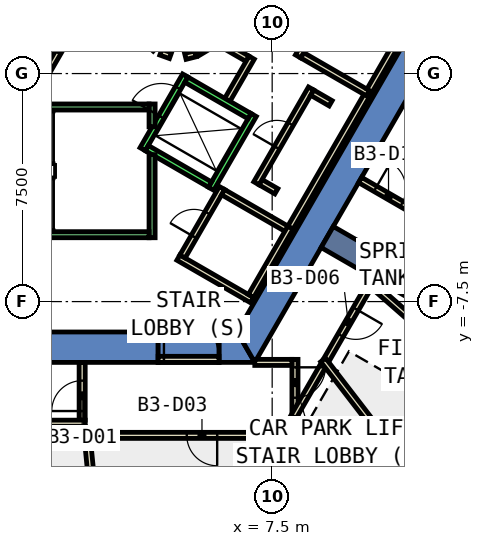
"""IFC4 building model, lengths in metres.
Left out: names, types, materials, properties, quantities, classifications, styles, units other than length and angle.
Written with IfcOpenShell. Run it as: python <this file> out.ifc"""

import sys

from ifc_helpers import new_model, si_unit, direction, frame, frame_2d, origin, place, context, subcontext, project, spatial, polyline, rectangle, outline, extrude, element, fill, save


model = new_model("IFC4")
c1 = context("Model", 3, precision=1e-05, world=origin(), true_north=direction((0.0, 1.0)))
c2 = subcontext(c1, "Body", "Model", "MODEL_VIEW")
j1 = project(units=[si_unit("LENGTHUNIT", "METRE"), si_unit("PLANEANGLEUNIT", "RADIAN")], contexts=[c1])
p1 = place(None, origin())
s1 = spatial("IfcSite", under=j1, at=p1, CompositionType="ELEMENT")
p2 = place(p1, origin())
s2 = spatial("IfcBuilding", under=s1, at=p2, CompositionType="ELEMENT")
p3 = place(p2, frame((0.0, 0.0, -16.5)))
s3 = spatial("IfcBuildingStorey", under=s2, at=p3, CompositionType="ELEMENT", Elevation=-16.5)
p4 = place(p3, origin())
e1 = element("IfcWall", 1, at=p4, inside=s3, PredefinedType="SHEAR", context=c2, shape_type="SweptSolid", body=[
    extrude(outline(polyline([(3.75, -9.5), (3.75, -8.5), (-6.351, -8.5), (-6.928, -9.5), (3.75, -9.5)])), origin(), (0.0, 0.0, 1.0), 5.08),
])
p5 = place(p3, origin())
e2 = element("IfcWall", 2, at=p5, inside=s3, PredefinedType="SHEAR", context=c2, shape_type="SweptSolid", body=[
    extrude(outline(polyline([(5.75, -8.5), (5.75, -9.5), (6.928, -9.5), (6.351, -8.5), (5.75, -8.5)])), origin(), (0.0, 0.0, 1.0), 5.08),
])
p6 = place(p3, frame((0.0, 0.0, 3.6)))
e3 = element("IfcWall", 3, at=p6, inside=s3, PredefinedType="SHEAR", context=c2, shape_type="SweptSolid", body=[
    extrude(outline(polyline([(5.75, -9.5), (5.75, -8.5), (3.75, -8.5), (3.75, -9.5), (5.75, -9.5)])), origin(), (0.0, 0.0, 1.0), 1.48),
])
p7 = place(p3, origin())
e4 = element("IfcWall", 4, at=p7, inside=s3, PredefinedType="SHEAR", context=c2, shape_type="SweptSolid", body=[
    extrude(outline(polyline([(6.928, -9.5), (13.856, 2.5), (12.702, 2.5), (6.351, -8.5), (6.928, -9.5)])), origin(), (0.0, 0.0, 1.0), 5.08),
])
p8 = place(p3, frame((9.31, -5.375, 0.0), z_axis=(0.0, 0.0, 1.0), x_axis=(0.866017533419, -0.500013631625, 0.0)))
e5 = element("IfcWall", 5, at=p8, inside=s3, PredefinedType="SHEAR", context=c2, shape_type="SweptSolid", body=[
    extrude(rectangle(XDim=9.0, YDim=0.8, at=frame_2d((4.5, 0.0))), origin(), (0.0, 0.0, 1.0), 5.08),
])
p9 = place(p3, frame((1.25, -11.4, 0.0), z_axis=(0.0, 0.0, 1.0), x_axis=(0.0, 1.0, 0.0)))
e6 = element("IfcWall", 6, at=p9, inside=s3, PredefinedType="PARTITIONING", context=c2, shape_type="SweptSolid", body=[
    extrude(rectangle(XDim=1.9, YDim=0.2, at=frame_2d((0.95, 0.0))), origin(), (0.0, 0.0, 1.0), 5.08),
])
p10 = place(p9, frame((0.3, 0.0, 0.0)))
e7 = element("IfcOpeningElement", 7, at=p10, cuts=e6, PredefinedType="OPENING", context=c2, shape_type="SweptSolid", body=[
    extrude(rectangle(XDim=1.0, YDim=2.1, at=frame_2d((0.5, 1.05))), frame((0.0, 0.11, 0.0), z_axis=(0.0, -1.0, 0.0), x_axis=(1.0, 0.0, 0.0)), (0.0, 0.0, 1.0), 0.22),
])
p11 = place(p3, frame((8.25, -9.4, 0.0), z_axis=(0.0, 0.0, 1.0), x_axis=(0.0, -1.0, 0.0)))
e8 = element("IfcWall", 8, at=p11, inside=s3, PredefinedType="PARTITIONING", context=c2, shape_type="SweptSolid", body=[
    extrude(rectangle(XDim=1.71, YDim=0.2, at=frame_2d((0.855, 0.0))), origin(), (0.0, 0.0, 1.0), 5.08),
])
p12 = place(p11, frame((0.262, 0.0, 0.0)))
e9 = element("IfcOpeningElement", 9, at=p12, cuts=e8, PredefinedType="OPENING", context=c2, shape_type="SweptSolid", body=[
    extrude(rectangle(XDim=1.0, YDim=2.1, at=frame_2d((0.5, 1.05))), frame((0.0, 0.11, 0.0), z_axis=(0.0, -1.0, 0.0), x_axis=(1.0, 0.0, 0.0)), (0.0, 0.0, 1.0), 0.22),
])
p13 = place(p3, frame((6.928, -9.5, 0.0), z_axis=(0.0, 0.0, 1.0), x_axis=(1.0, 0.0, 0.0)))
e10 = element("IfcWall", 10, at=p13, inside=s3, PredefinedType="PARTITIONING", context=c2, shape_type="SweptSolid", body=[
    extrude(rectangle(XDim=1.222, YDim=0.2, at=frame_2d((0.611, 0.0))), origin(), (0.0, 0.0, 1.0), 5.08),
])
p14 = place(p3, frame((8.25, -11.31, 0.0), z_axis=(0.0, 0.0, 1.0), x_axis=(0.0, -1.0, 0.0)))
e11 = element("IfcWall", 11, at=p14, inside=s3, PredefinedType="PARTITIONING", context=c2, shape_type="SweptSolid", body=[
    extrude(rectangle(XDim=0.49, YDim=0.2, at=frame_2d((0.245, 0.0))), origin(), (0.0, 0.0, 1.0), 5.08),
])
p15 = place(p3, frame((8.35, -11.9, 0.0), z_axis=(0.0, 0.0, 1.0), x_axis=(-1.0, 0.0, 0.0)))
e12 = element("IfcWall", 12, at=p15, inside=s3, PredefinedType="PARTITIONING", context=c2, shape_type="SweptSolid", body=[
    extrude(rectangle(XDim=7.039, YDim=0.2, at=frame_2d((3.52, 0.0))), origin(), (0.0, 0.0, 1.0), 5.08),
])
p16 = place(p15, frame((2.659, 0.0, 0.0)))
e13 = element("IfcOpeningElement", 13, at=p16, cuts=e12, PredefinedType="OPENING", context=c2, shape_type="SweptSolid", body=[
    extrude(rectangle(XDim=1.0, YDim=2.1, at=frame_2d((0.5, 1.05))), frame((0.0, 0.11, 0.0), z_axis=(0.0, -1.0, 0.0), x_axis=(1.0, 0.0, 0.0)), (0.0, 0.0, 1.0), 0.22),
])
p17 = place(p3, frame((1.25, -12.0, 0.0), z_axis=(0.0, 0.0, 1.0), x_axis=(0.0, 1.0, 0.0)))
e14 = element("IfcWall", 14, at=p17, inside=s3, PredefinedType="PARTITIONING", context=c2, shape_type="SweptSolid", body=[
    extrude(rectangle(XDim=0.4, YDim=0.2, at=frame_2d((0.2, 0.0))), origin(), (0.0, 0.0, 1.0), 5.08),
])
p18 = place(p3, frame((1.35, -11.5, 0.0), z_axis=(0.0, 0.0, 1.0), x_axis=(-1.0, 0.0, 0.0)))
e15 = element("IfcWall", 15, at=p18, inside=s3, PredefinedType="PARTITIONING", context=c2, shape_type="SweptSolid", body=[
    extrude(rectangle(XDim=8.646, YDim=0.2, at=frame_2d((4.323, 0.0))), origin(), (0.0, 0.0, 1.0), 5.08),
])
p19 = place(p18, frame((3.768, 0.0, 0.0)))
e16 = element("IfcOpeningElement", 16, at=p19, cuts=e15, PredefinedType="OPENING", context=c2, shape_type="SweptSolid", body=[
    extrude(rectangle(XDim=1.0, YDim=2.1, at=frame_2d((0.5, 1.05))), frame((0.0, 0.11, 0.0), z_axis=(0.0, -1.0, 0.0), x_axis=(1.0, 0.0, 0.0)), (0.0, 0.0, 1.0), 0.22),
])
p20 = place(p3, frame((9.238, -9.498, 0.0), z_axis=(0.0, 0.0, 1.0), x_axis=(-0.499780113518, -0.866152318089, 0.0)))
e17 = element("IfcWall", 17, at=p20, inside=s3, PredefinedType="PARTITIONING", context=c2, shape_type="SweptSolid", body=[
    extrude(rectangle(XDim=2.077, YDim=0.2, at=frame_2d((1.039, 0.0))), origin(), (0.0, 0.0, 1.0), 5.08),
])
p21 = place(p3, frame((10.738, -6.901, 0.0), z_axis=(0.0, 0.0, 1.0), x_axis=(-0.500131122175, -0.865949687125, 0.0)))
e18 = element("IfcWall", 18, at=p21, inside=s3, PredefinedType="PARTITIONING", context=c2, shape_type="SweptSolid", body=[
    extrude(rectangle(XDim=2.999, YDim=0.2, at=frame_2d((1.5, 0.0))), origin(), (0.0, 0.0, 1.0), 5.08),
])
p22 = place(p21, frame((0.972, 0.0, 0.0)))
e19 = element("IfcOpeningElement", 19, at=p22, cuts=e18, PredefinedType="OPENING", context=c2, shape_type="SweptSolid", body=[
    extrude(rectangle(XDim=1.0, YDim=2.1, at=frame_2d((0.5, 1.05))), frame((0.0, 0.11, 0.0), z_axis=(0.0, -1.0, 0.0), x_axis=(1.0, 0.0, 0.0)), (0.0, 0.0, 1.0), 0.22),
])
p23 = place(p3, frame((1.587, -13.7, 0.0), z_axis=(0.0, 0.0, 1.0), x_axis=(-0.097324991698, 0.99525265435, 0.0)))
e20 = element("IfcWall", 20, at=p23, inside=s3, PredefinedType="PARTITIONING", context=c2, shape_type="SweptSolid", body=[
    extrude(rectangle(XDim=1.809, YDim=0.2, at=frame_2d((0.904, 0.0))), origin(), (0.0, 0.0, 1.0), 5.08),
])
p24 = place(p3, frame((9.177, -9.419, 0.0), z_axis=(0.0, 0.0, 1.0), x_axis=(0.610158732695, -0.792279193792, 0.0)))
e21 = element("IfcWall", 21, at=p24, inside=s3, PredefinedType="PARTITIONING", context=c2, shape_type="SweptSolid", body=[
    extrude(rectangle(XDim=5.53, YDim=0.2, at=frame_2d((2.765, 0.0))), origin(), (0.0, 0.0, 1.0), 5.08),
])
p25 = place(p3, frame((10.663, -6.835, 0.0), z_axis=(0.0, 0.0, 1.0), x_axis=(0.752269740493, -0.658855247788, 0.0)))
e22 = element("IfcWall", 22, at=p25, inside=s3, PredefinedType="PARTITIONING", context=c2, shape_type="SweptSolid", body=[
    extrude(rectangle(XDim=5.865, YDim=0.2, at=frame_2d((2.932, 0.0))), origin(), (0.0, 0.0, 1.0), 5.08),
])
p26 = place(p3, frame((10.392, -3.5, 0.0), z_axis=(0.0, 0.0, 1.0), x_axis=(0.866010750942, -0.50002537861, 0.0)))
e23 = element("IfcWall", 23, at=p26, inside=s3, PredefinedType="PARTITIONING", context=c2, shape_type="SweptSolid", body=[
    extrude(rectangle(XDim=2.0, YDim=0.2, at=frame_2d((1.0, 0.0))), origin(), (0.0, 0.0, 1.0), 5.08),
])
p27 = place(p26, frame((0.58, 0.0, 0.0)))
e24 = element("IfcOpeningElement", 24, at=p27, cuts=e23, PredefinedType="OPENING", context=c2, shape_type="SweptSolid", body=[
    extrude(rectangle(XDim=1.0, YDim=2.1, at=frame_2d((0.5, 1.05))), frame((0.0, 0.11, 0.0), z_axis=(0.0, -1.0, 0.0), x_axis=(1.0, 0.0, 0.0)), (0.0, 0.0, 1.0), 0.22),
])
p28 = place(p3, frame((6.84, -7.453, 0.0), z_axis=(0.0, 0.0, 1.0), x_axis=(-0.866056369097, 0.49994636267, 0.0)))
e25 = element("IfcWall", 25, at=p28, inside=s3, PredefinedType="PARTITIONING", context=c2, shape_type="SweptSolid", body=[
    extrude(rectangle(XDim=2.8, YDim=0.2, at=frame_2d((1.4, 0.0))), origin(), (0.0, 0.0, 1.0), 5.08),
])
p29 = place(p3, frame((4.551, -6.017, 0.0), z_axis=(0.0, 0.0, 1.0), x_axis=(0.499925626596, 0.866068339032, 0.0)))
e26 = element("IfcWall", 26, at=p29, inside=s3, PredefinedType="PARTITIONING", context=c2, shape_type="SweptSolid", body=[
    extrude(rectangle(XDim=2.601, YDim=0.2, at=frame_2d((1.3, 0.0))), origin(), (0.0, 0.0, 1.0), 5.08),
])
p30 = place(p29, frame((0.75, 0.0, 0.0)))
e27 = element("IfcOpeningElement", 27, at=p30, cuts=e26, PredefinedType="OPENING", context=c2, shape_type="SweptSolid", body=[
    extrude(rectangle(XDim=0.9, YDim=2.1, at=frame_2d((0.45, 1.05))), frame((0.0, 0.11, 0.0), z_axis=(0.0, -1.0, 0.0), x_axis=(1.0, 0.0, 0.0)), (0.0, 0.0, 1.0), 0.22),
])
p31 = place(p3, frame((5.888, -3.902, 0.0), z_axis=(0.0, 0.0, 1.0), x_axis=(0.866022959057, -0.500004234368, 0.0)))
e28 = element("IfcWall", 28, at=p31, inside=s3, PredefinedType="PARTITIONING", context=c2, shape_type="SweptSolid", body=[
    extrude(rectangle(XDim=2.5, YDim=0.2, at=frame_2d((1.25, 0.0))), origin(), (0.0, 0.0, 1.0), 5.08),
])
p32 = place(p3, frame((8.103, -5.065, 0.0), z_axis=(0.0, 0.0, 1.0), x_axis=(-0.49996627774, -0.866044872465, 0.0)))
e29 = element("IfcWall", 29, at=p32, inside=s3, PredefinedType="PARTITIONING", context=c2, shape_type="SweptSolid", body=[
    extrude(rectangle(XDim=2.6, YDim=0.2, at=frame_2d((1.3, 0.0))), origin(), (0.0, 0.0, 1.0), 5.08),
])
p33 = place(p3, frame((7.637, -3.872, 0.0), z_axis=(0.0, 0.0, 1.0), x_axis=(-0.866158505053, 0.499769390944, 0.0)))
e30 = element("IfcWall", 30, at=p33, inside=s3, PredefinedType="PARTITIONING", context=c2, shape_type="SweptSolid", body=[
    extrude(rectangle(XDim=0.6, YDim=0.2, at=frame_2d((0.3, 0.0))), origin(), (0.0, 0.0, 1.0), 5.08),
])
p34 = place(p3, frame((6.981, -3.609, 0.0), z_axis=(0.0, 0.0, 1.0), x_axis=(0.499982693035, 0.866035395735, 0.0)))
e31 = element("IfcWall", 31, at=p34, inside=s3, PredefinedType="PARTITIONING", context=c2, shape_type="SweptSolid", body=[
    extrude(rectangle(XDim=3.6, YDim=0.2, at=frame_2d((1.8, 0.0))), origin(), (0.0, 0.0, 1.0), 5.08),
])
p35 = place(p34, frame((1.35, 0.0, 0.0)))
e32 = element("IfcOpeningElement", 32, at=p35, cuts=e31, PredefinedType="OPENING", context=c2, shape_type="SweptSolid", body=[
    extrude(rectangle(XDim=0.9, YDim=2.1, at=frame_2d((0.45, 1.05))), frame((0.0, 0.11, 0.0), z_axis=(0.0, -1.0, 0.0), x_axis=(1.0, 0.0, 0.0)), (0.0, 0.0, 1.0), 0.22),
])
p36 = place(p3, frame((8.817, -0.628, 0.0), z_axis=(0.0, 0.0, 1.0), x_axis=(0.866307342011, -0.4995113504, 0.0)))
e33 = element("IfcWall", 33, at=p36, inside=s3, PredefinedType="PARTITIONING", context=c2, shape_type="SweptSolid", body=[
    extrude(rectangle(XDim=0.701, YDim=0.2, at=frame_2d((0.351, 0.0))), origin(), (0.0, 0.0, 1.0), 5.08),
])
p37 = place(p3, frame((10.703, -0.562, 0.0), z_axis=(0.0, 0.0, 1.0), x_axis=(-0.500012382935, -0.866018254376, 0.0)))
e34 = element("IfcWall", 34, at=p37, inside=s3, PredefinedType="PARTITIONING", context=c2, shape_type="SweptSolid", body=[
    extrude(rectangle(XDim=5.199, YDim=0.2, at=frame_2d((2.6, 0.0))), origin(), (0.0, 0.0, 1.0), 5.08),
])
p38 = place(p3, frame((10.653, -0.648, 0.0), z_axis=(0.0, 0.0, 1.0), x_axis=(-0.866022959057, 0.500004234368, 0.0)))
e35 = element("IfcWall", 35, at=p38, inside=s3, PredefinedType="PARTITIONING", context=c2, shape_type="SweptSolid", body=[
    extrude(rectangle(XDim=2.5, YDim=0.2, at=frame_2d((1.25, 0.0))), origin(), (0.0, 0.0, 1.0), 5.08),
])
p39 = place(p3, frame((11.903, 1.517, 0.0), z_axis=(0.0, 0.0, 1.0), x_axis=(-0.499945471869, -0.866056883327, 0.0)))
e36 = element("IfcWall", 36, at=p39, inside=s3, PredefinedType="PARTITIONING", context=c2, shape_type="SweptSolid", body=[
    extrude(rectangle(XDim=2.401, YDim=0.2, at=frame_2d((1.2, 0.0))), origin(), (0.0, 0.0, 1.0), 5.08),
])
p40 = place(p3, frame((8.351, 0.565, 0.0), z_axis=(0.0, 0.0, 1.0), x_axis=(0.49989585183, 0.866085525409, 0.0)))
e37 = element("IfcWall", 37, at=p40, inside=s3, PredefinedType="PARTITIONING", context=c2, shape_type="SweptSolid", body=[
    extrude(rectangle(XDim=2.6, YDim=0.2, at=frame_2d((1.3, 0.0))), origin(), (0.0, 0.0, 1.0), 5.08),
])
p41 = place(p40, frame((0.95, 0.0, 0.0)))
e38 = element("IfcOpeningElement", 38, at=p41, cuts=e37, PredefinedType="OPENING", context=c2, shape_type="SweptSolid", body=[
    extrude(rectangle(XDim=0.9, YDim=2.1, at=frame_2d((0.45, 1.05))), frame((0.0, 0.11, 0.0), z_axis=(0.0, -1.0, 0.0), x_axis=(1.0, 0.0, 0.0)), (0.0, 0.0, 1.0), 0.22),
])
p42 = place(p3, frame((3.838, 0.702, 0.0), z_axis=(0.0, 0.0, 1.0), x_axis=(0.941035081519, -0.338308993895, 0.0)))
e39 = element("IfcWall", 39, at=p42, inside=s3, PredefinedType="PARTITIONING", context=c2, shape_type="SweptSolid", body=[
    extrude(rectangle(XDim=0.337, YDim=0.2, at=frame_2d((0.168, 0.0))), origin(), (0.0, 0.0, 1.0), 5.08),
])
p43 = place(p3, frame((4.644, 0.564, 0.0), z_axis=(0.0, 0.0, 1.0), x_axis=(0.969929076366, 0.243387729394, 0.0)))
e40 = element("IfcWall", 40, at=p43, inside=s3, PredefinedType="PARTITIONING", context=c2, shape_type="SweptSolid", body=[
    extrude(rectangle(XDim=0.337, YDim=0.2, at=frame_2d((0.168, 0.0))), origin(), (0.0, 0.0, 1.0), 5.08),
])
p44 = place(p3, frame((5.042, 0.676, 0.0), z_axis=(0.0, 0.0, 1.0), x_axis=(0.857940155512, 0.513749637042, 0.0)))
e41 = element("IfcWall", 41, at=p44, inside=s3, PredefinedType="PARTITIONING", context=c2, shape_type="SweptSolid", body=[
    extrude(rectangle(XDim=0.337, YDim=0.2, at=frame_2d((0.168, 0.0))), origin(), (0.0, 0.0, 1.0), 5.08),
])
p45 = place(p3, frame((5.499, 1.172, 0.0), z_axis=(0.0, 0.0, 1.0), x_axis=(0.866333505267, -0.499465972466, 0.0)))
e42 = element("IfcWall", 42, at=p45, inside=s3, PredefinedType="PARTITIONING", context=c2, shape_type="SweptSolid", body=[
    extrude(rectangle(XDim=1.374, YDim=0.2, at=frame_2d((0.687, 0.0))), origin(), (0.0, 0.0, 1.0), 5.08),
])
p46 = place(p3, frame((6.826, 0.522, 0.0), z_axis=(0.0, 0.0, 1.0), x_axis=(-0.500016722714, -0.866015748706, 0.0)))
e43 = element("IfcWall", 43, at=p46, inside=s3, PredefinedType="PARTITIONING", context=c2, shape_type="SweptSolid", body=[
    extrude(rectangle(XDim=1.7, YDim=0.2, at=frame_2d((0.85, 0.0))), origin(), (0.0, 0.0, 1.0), 5.08),
])
p47 = place(p3, frame((-0.52, -1.0, 0.0), z_axis=(0.0, 0.0, 1.0), x_axis=(0.50011622646, 0.865958290007, 0.0)))
e44 = element("IfcWall", 44, at=p47, inside=s3, PredefinedType="PARTITIONING", context=c2, shape_type="SweptSolid", body=[
    extrude(rectangle(XDim=4.991, YDim=0.2, at=frame_2d((2.496, 0.0))), origin(), (0.0, 0.0, 1.0), 5.08),
])
p48 = place(p47, frame((1.945, 0.0, 0.0)))
e45 = element("IfcOpeningElement", 45, at=p48, cuts=e44, PredefinedType="OPENING", context=c2, shape_type="SweptSolid", body=[
    extrude(rectangle(XDim=1.0, YDim=2.1, at=frame_2d((0.5, 1.05))), frame((0.0, 0.11, 0.0), z_axis=(0.0, -1.0, 0.0), x_axis=(1.0, 0.0, 0.0)), (0.0, 0.0, 1.0), 0.22),
])
p49 = place(p3, frame((3.75, -9.4, 0.0), z_axis=(0.0, 0.0, 1.0), x_axis=(1.0, 0.0, 0.0)))
e46 = element("IfcWall", 46, at=p49, inside=s3, PredefinedType="PARTITIONING", context=c2, shape_type="SweptSolid", body=[
    extrude(rectangle(XDim=2.0, YDim=0.2, at=frame_2d((1.0, 0.0))), origin(), (0.0, 0.0, 1.0), 2.4),
])
p50 = place(p49, frame((0.19, 0.0, 0.0)))
e47 = element("IfcOpeningElement", 47, at=p50, cuts=e46, PredefinedType="OPENING", context=c2, shape_type="SweptSolid", body=[
    extrude(rectangle(XDim=1.8, YDim=2.1, at=frame_2d((0.9, 1.05))), frame((0.0, 0.11, 0.0), z_axis=(0.0, -1.0, 0.0), x_axis=(1.0, 0.0, 0.0)), (0.0, 0.0, 1.0), 0.22),
])
p51 = place(p3, frame((3.24, -2.488, 0.0), z_axis=(0.0, 0.0, 1.0), x_axis=(0.49994636267, 0.866056369097, 0.0)))
e48 = element("IfcWall", 48, at=p51, inside=s3, PredefinedType="STANDARD", context=c2, shape_type="SweptSolid", body=[
    extrude(rectangle(XDim=2.8, YDim=0.2, at=frame_2d((1.4, 0.0))), origin(), (0.0, 0.0, 1.0), 5.08),
])
p52 = place(p51, frame((1.225, 0.0, 0.0)))
e49 = element("IfcOpeningElement", 49, at=p52, cuts=e48, PredefinedType="OPENING", context=c2, shape_type="SweptSolid", body=[
    extrude(rectangle(XDim=1.1, YDim=2.1, at=frame_2d((0.55, 1.05))), frame((0.0, 0.11, 0.0), z_axis=(0.0, -1.0, 0.0), x_axis=(1.0, 0.0, 0.0)), (0.0, 0.0, 1.0), 0.22),
])
p53 = place(p3, frame((5.492, -3.788, 0.0), z_axis=(0.0, 0.0, 1.0), x_axis=(0.500011755427, 0.866018616679, 0.0)))
e50 = element("IfcWall", 50, at=p53, inside=s3, PredefinedType="STANDARD", context=c2, shape_type="SweptSolid", body=[
    extrude(rectangle(XDim=2.8, YDim=0.2, at=frame_2d((1.4, 0.0))), origin(), (0.0, 0.0, 1.0), 5.08),
])
p54 = place(p3, frame((3.377, -2.452, 0.0), z_axis=(0.0, 0.0, 1.0), x_axis=(0.865955154139, -0.50012165622, 0.0)))
e51 = element("IfcWall", 51, at=p54, inside=s3, PredefinedType="STANDARD", context=c2, shape_type="SweptSolid", body=[
    extrude(rectangle(XDim=2.4, YDim=0.2, at=frame_2d((1.2, 0.0))), origin(), (0.0, 0.0, 1.0), 5.08),
])
p55 = place(p3, frame((4.677, -0.2, 0.0), z_axis=(0.0, 0.0, 1.0), x_axis=(0.865973769406, -0.500089422704, 0.0)))
e52 = element("IfcWall", 52, at=p55, inside=s3, PredefinedType="STANDARD", context=c2, shape_type="SweptSolid", body=[
    extrude(rectangle(XDim=2.399, YDim=0.2, at=frame_2d((1.2, 0.0))), origin(), (0.0, 0.0, 1.0), 5.08),
])
p56 = place(p3, frame((3.55, -2.667, 0.0), z_axis=(0.0, 0.0, 1.0), x_axis=(0.0, -1.0, 0.0)))
e53 = element("IfcWall", 53, at=p56, inside=s3, PredefinedType="STANDARD", context=c2, shape_type="SweptSolid", body=[
    extrude(rectangle(XDim=2.733, YDim=0.2, at=frame_2d((1.366, 0.0))), origin(), (0.0, 0.0, 1.0), 5.08),
])
p57 = place(p3, frame((3.55, -1.0, 0.0), z_axis=(0.0, 0.0, 1.0), x_axis=(0.0, -1.0, 0.0)))
e54 = element("IfcWall", 54, at=p57, inside=s3, PredefinedType="STANDARD", context=c2, shape_type="SweptSolid", body=[
    extrude(rectangle(XDim=0.751, YDim=0.2, at=frame_2d((0.375, 0.0))), origin(), (0.0, 0.0, 1.0), 5.08),
])
p58 = place(p3, frame((-3.45, -1.1, 0.0), z_axis=(0.0, 0.0, 1.0), x_axis=(1.0, 0.0, 0.0)))
e55 = element("IfcWall", 55, at=p58, inside=s3, PredefinedType="STANDARD", context=c2, shape_type="SweptSolid", body=[
    extrude(rectangle(XDim=6.9, YDim=0.2, at=frame_2d((3.45, 0.0))), origin(), (0.0, 0.0, 1.0), 5.08),
])
p59 = place(p58, frame((0.45, 0.0, 0.0)))
e56 = element("IfcOpeningElement", 56, at=p59, cuts=e55, PredefinedType="OPENING", context=c2, shape_type="SweptSolid", body=[
    extrude(rectangle(XDim=1.1, YDim=2.2, at=frame_2d((0.55, 1.1))), frame((0.0, 0.11, 0.0), z_axis=(0.0, -1.0, 0.0), x_axis=(1.0, 0.0, 0.0)), (0.0, 0.0, 1.0), 0.22),
])
p60 = place(p3, frame((-3.45, -5.3, 0.0), z_axis=(0.0, 0.0, 1.0), x_axis=(1.0, 0.0, 0.0)))
e57 = element("IfcWall", 57, at=p60, inside=s3, PredefinedType="STANDARD", context=c2, shape_type="SweptSolid", body=[
    extrude(rectangle(XDim=6.9, YDim=0.2, at=frame_2d((3.45, 0.0))), origin(), (0.0, 0.0, 1.0), 5.08),
])
p61 = place(p10, origin())
e58 = element("IfcDoor", 58, at=p61, inside=s3, OperationType="SINGLE_SWING_LEFT", PredefinedType="DOOR", context=c2, shape_type="SweptSolid", body=[
    extrude(rectangle(XDim=1.0, YDim=2.1, at=frame_2d((0.5, 1.05))), frame((0.0, 0.025, 0.0), z_axis=(0.0, -1.0, 0.0), x_axis=(1.0, 0.0, 0.0)), (0.0, 0.0, 1.0), 0.05),
])
fill(e7, e58)
p62 = place(p12, origin())
e59 = element("IfcDoor", 59, at=p62, inside=s3, OperationType="SINGLE_SWING_RIGHT", PredefinedType="DOOR", context=c2, shape_type="SweptSolid", body=[
    extrude(rectangle(XDim=1.0, YDim=2.1, at=frame_2d((0.5, 1.05))), frame((0.0, 0.025, 0.0), z_axis=(0.0, -1.0, 0.0), x_axis=(1.0, 0.0, 0.0)), (0.0, 0.0, 1.0), 0.05),
])
fill(e9, e59)
p63 = place(p16, origin())
e60 = element("IfcDoor", 60, at=p63, inside=s3, OperationType="SINGLE_SWING_LEFT", PredefinedType="DOOR", context=c2, shape_type="SweptSolid", body=[
    extrude(rectangle(XDim=1.0, YDim=2.1, at=frame_2d((0.5, 1.05))), frame((0.0, 0.025, 0.0), z_axis=(0.0, -1.0, 0.0), x_axis=(1.0, 0.0, 0.0)), (0.0, 0.0, 1.0), 0.05),
])
fill(e13, e60)
p64 = place(p22, origin())
e61 = element("IfcDoor", 61, at=p64, inside=s3, OperationType="SINGLE_SWING_RIGHT", PredefinedType="DOOR", context=c2, shape_type="SweptSolid", body=[
    extrude(rectangle(XDim=1.0, YDim=2.1, at=frame_2d((0.5, 1.05))), frame((0.0, 0.025, 0.0), z_axis=(0.0, -1.0, 0.0), x_axis=(1.0, 0.0, 0.0)), (0.0, 0.0, 1.0), 0.05),
])
fill(e19, e61)
p65 = place(p27, origin())
e62 = element("IfcDoor", 62, at=p65, inside=s3, OperationType="SINGLE_SWING_LEFT", PredefinedType="DOOR", context=c2, shape_type="SweptSolid", body=[
    extrude(rectangle(XDim=1.0, YDim=2.1, at=frame_2d((0.5, 1.05))), frame((0.0, 0.025, 0.0), z_axis=(0.0, -1.0, 0.0), x_axis=(1.0, 0.0, 0.0)), (0.0, 0.0, 1.0), 0.05),
])
fill(e24, e62)
p66 = place(p48, origin())
e63 = element("IfcDoor", 63, at=p66, inside=s3, OperationType="SINGLE_SWING_LEFT", PredefinedType="DOOR", context=c2, shape_type="SweptSolid", body=[
    extrude(rectangle(XDim=1.0, YDim=2.1, at=frame_2d((0.5, 1.05))), frame((0.0, 0.025, 0.0), z_axis=(0.0, -1.0, 0.0), x_axis=(1.0, 0.0, 0.0)), (0.0, 0.0, 1.0), 0.05),
])
fill(e45, e63)
p67 = place(p30, origin())
e64 = element("IfcDoor", 64, at=p67, inside=s3, OperationType="SINGLE_SWING_RIGHT", PredefinedType="DOOR", context=c2, shape_type="SweptSolid", body=[
    extrude(rectangle(XDim=0.9, YDim=2.1, at=frame_2d((0.45, 1.05))), frame((0.0, 0.025, 0.0), z_axis=(0.0, -1.0, 0.0), x_axis=(1.0, 0.0, 0.0)), (0.0, 0.0, 1.0), 0.05),
])
fill(e27, e64)
p68 = place(p35, origin())
e65 = element("IfcDoor", 65, at=p68, inside=s3, OperationType="SINGLE_SWING_RIGHT", PredefinedType="DOOR", context=c2, shape_type="SweptSolid", body=[
    extrude(rectangle(XDim=0.9, YDim=2.1, at=frame_2d((0.45, 1.05))), frame((0.0, 0.025, 0.0), z_axis=(0.0, -1.0, 0.0), x_axis=(1.0, 0.0, 0.0)), (0.0, 0.0, 1.0), 0.05),
])
fill(e32, e65)
p69 = place(p50, origin())
e66 = element("IfcDoor", 66, at=p69, inside=s3, OperationType="DOUBLE_DOOR_SINGLE_SWING", PredefinedType="DOOR", context=c2, shape_type="SweptSolid", body=[
    extrude(rectangle(XDim=1.8, YDim=2.1, at=frame_2d((0.9, 1.05))), frame((0.0, 0.025, 0.0), z_axis=(0.0, -1.0, 0.0), x_axis=(1.0, 0.0, 0.0)), (0.0, 0.0, 1.0), 0.05),
])
fill(e47, e66)
p70 = place(p52, origin())
e67 = element("IfcDoor", 67, at=p70, inside=s3, OperationType="SLIDING_TO_LEFT", PredefinedType="DOOR", context=c2, shape_type="SweptSolid", body=[
    extrude(rectangle(XDim=1.1, YDim=2.1, at=frame_2d((0.55, 1.05))), frame((0.0, 0.025, 0.0), z_axis=(0.0, -1.0, 0.0), x_axis=(1.0, 0.0, 0.0)), (0.0, 0.0, 1.0), 0.05),
])
fill(e49, e67)
save(model, sys.argv[1])
